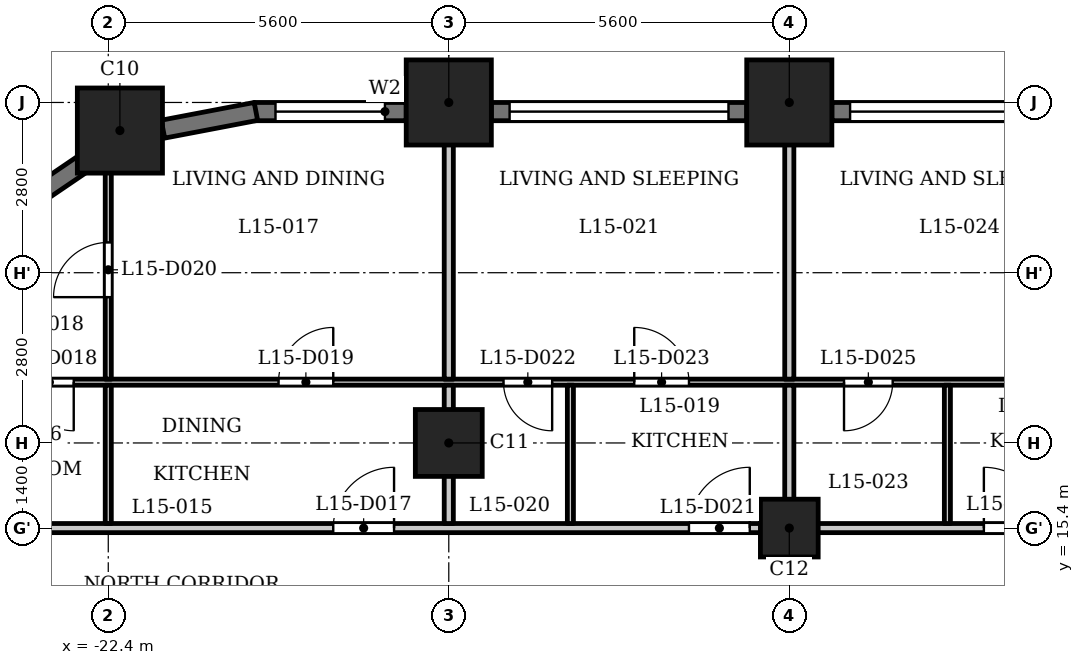
"""IFC4 building model, lengths in metres.
Left out: names, types, materials, properties, quantities, classifications, styles, units other than length and angle.
Written with IfcOpenShell. Run it as: python <this file> out.ifc"""

import sys

from ifc_helpers import new_model, si_unit, direction, frame, frame_2d, origin, origin_2d, place, context, subcontext, project, spatial, rectangle, extrude, element, fill, save


model = new_model("IFC4")
c1 = context("Model", 3, precision=1e-05, world=origin(), true_north=direction((0.0, 1.0)))
c2 = subcontext(c1, "Body", "Model", "MODEL_VIEW")
j1 = project(units=[si_unit("LENGTHUNIT", "METRE"), si_unit("PLANEANGLEUNIT", "RADIAN")], contexts=[c1])
p1 = place(None, origin())
s1 = spatial("IfcSite", under=j1, at=p1, CompositionType="ELEMENT")
p2 = place(p1, origin())
s2 = spatial("IfcBuilding", under=s1, at=p2, CompositionType="ELEMENT")
p3 = place(p2, frame((0.0, 0.0, 62.0)))
s3 = spatial("IfcBuildingStorey", under=s2, at=p3, CompositionType="ELEMENT", Elevation=62.0)
for number, where, z_axis, x_axis in (
    (1, (-11.2, 22.4, 0.0), (0.0, 0.0, 1.0), (1.0, 0.0, 0.0)),
    (2, (-16.8, 22.4, 0.0), (0.0, 0.0, 1.0), (1.0, 0.0, 0.0)),
    (3, (-22.209, 21.938, 0.0), (0.0, 0.0, 1.0), (1.0, 0.0, 0.0)),
):
    element("IfcColumn", number, at=place(p3, frame(where, z_axis=z_axis, x_axis=x_axis)), inside=s3, PredefinedType="COLUMN", context=c2, shape_type="SweptSolid", body=[
        extrude(rectangle(XDim=1.4, YDim=1.4, at=origin_2d()), origin(), (0.0, 0.0, 1.0), 3.5),
    ])
p4 = place(p3, frame((-16.8, 16.8, 0.0), z_axis=(0.0, 0.0, 1.0), x_axis=(1.0, 0.0, 0.0)))
e4 = element("IfcColumn", 4, at=p4, inside=s3, PredefinedType="COLUMN", context=c2, shape_type="SweptSolid", body=[
    extrude(rectangle(XDim=1.1, YDim=1.1, at=origin_2d()), origin(), (0.0, 0.0, 1.0), 3.5),
])
p5 = place(p3, frame((-11.2, 15.4, 0.0), z_axis=(0.0, 0.0, 1.0), x_axis=(1.0, 0.0, 0.0)))
e5 = element("IfcColumn", 5, at=p5, inside=s3, PredefinedType="COLUMN", context=c2, shape_type="SweptSolid", body=[
    extrude(rectangle(XDim=0.95, YDim=0.95, at=origin_2d()), origin(), (0.0, 0.0, 1.0), 3.5),
])
p6 = place(p3, frame((-6.3, 22.25, 0.0), z_axis=(0.0, 0.0, 1.0), x_axis=(-1.0, 0.0, 0.0)))
e6 = element("IfcWall", 6, at=p6, inside=s3, PredefinedType="SOLIDWALL", context=c2, shape_type="SweptSolid", body=[
    extrude(rectangle(XDim=4.2, YDim=0.3, at=frame_2d((2.1, 0.0))), origin(), (0.0, 0.0, 1.0), 2.35),
])
p7 = place(p6, frame((0.3, 0.0, 1.2)))
e7 = element("IfcOpeningElement", 7, at=p7, cuts=e6, PredefinedType="OPENING", context=c2, shape_type="SweptSolid", body=[
    extrude(rectangle(XDim=3.6, YDim=0.95, at=frame_2d((1.8, 0.475))), frame((0.0, 0.16, 0.0), z_axis=(0.0, -1.0, 0.0), x_axis=(1.0, 0.0, 0.0)), (0.0, 0.0, 1.0), 0.32),
])
p8 = place(p3, frame((-11.9, 22.25, 0.0), z_axis=(0.0, 0.0, 1.0), x_axis=(-1.0, 0.0, 0.0)))
e8 = element("IfcWall", 8, at=p8, inside=s3, PredefinedType="SOLIDWALL", context=c2, shape_type="SweptSolid", body=[
    extrude(rectangle(XDim=4.2, YDim=0.3, at=frame_2d((2.1, 0.0))), origin(), (0.0, 0.0, 1.0), 2.35),
])
p9 = place(p8, frame((0.3, 0.0, 1.2)))
e9 = element("IfcOpeningElement", 9, at=p9, cuts=e8, PredefinedType="OPENING", context=c2, shape_type="SweptSolid", body=[
    extrude(rectangle(XDim=3.6, YDim=0.95, at=frame_2d((1.8, 0.475))), frame((0.0, 0.16, 0.0), z_axis=(0.0, -1.0, 0.0), x_axis=(1.0, 0.0, 0.0)), (0.0, 0.0, 1.0), 0.32),
])
p10 = place(p3, frame((-17.5, 22.25, 0.0), z_axis=(0.0, 0.0, 1.0), x_axis=(-1.0, 0.0, 0.0)))
e10 = element("IfcWall", 10, at=p10, inside=s3, PredefinedType="SOLIDWALL", context=c2, shape_type="SweptSolid", body=[
    extrude(rectangle(XDim=2.5, YDim=0.3, at=frame_2d((1.25, 0.0))), origin(), (0.0, 0.0, 1.0), 2.35),
])
p11 = place(p10, frame((0.35, 0.0, 0.9)))
e11 = element("IfcOpeningElement", 11, at=p11, cuts=e10, PredefinedType="OPENING", context=c2, shape_type="SweptSolid", body=[
    extrude(rectangle(XDim=1.8, YDim=1.25, at=frame_2d((0.9, 0.625))), frame((0.0, 0.16, 0.0), z_axis=(0.0, -1.0, 0.0), x_axis=(1.0, 0.0, 0.0)), (0.0, 0.0, 1.0), 0.32),
])
p12 = place(p3, frame((-19.972, 22.253, 0.0), z_axis=(0.0, 0.0, 1.0), x_axis=(-0.982297345734, -0.187328386968, 0.0)))
e12 = element("IfcWall", 12, at=p12, inside=s3, PredefinedType="SOLIDWALL", context=c2, shape_type="SweptSolid", body=[
    extrude(rectangle(XDim=1.556, YDim=0.3, at=frame_2d((0.778, 0.0))), origin(), (0.0, 0.0, 1.0), 2.35),
])
p13 = place(p3, frame((-22.726, 21.454, 0.0), z_axis=(0.0, 0.0, 1.0), x_axis=(-0.827019875346, -0.562172683241, 0.0)))
e13 = element("IfcWall", 13, at=p13, inside=s3, PredefinedType="SOLIDWALL", context=c2, shape_type="SweptSolid", body=[
    extrude(rectangle(XDim=1.556, YDim=0.3, at=frame_2d((0.778, 0.0))), origin(), (0.0, 0.0, 1.0), 2.35),
])
p14 = place(p3, frame((-27.484, 15.4, 0.0), z_axis=(0.0, 0.0, 1.0), x_axis=(1.0, 0.0, 0.0)))
e14 = element("IfcWall", 14, at=p14, inside=s3, PredefinedType="PARTITIONING", context=c2, shape_type="SweptSolid", body=[
    extrude(rectangle(XDim=54.968, YDim=0.15, at=frame_2d((27.484, 0.0))), origin(), (0.0, 0.0, 1.0), 3.2),
])
p15 = place(p14, frame((8.784, 0.0, 0.0)))
e15 = element("IfcOpeningElement", 15, at=p15, cuts=e14, PredefinedType="OPENING", context=c2, shape_type="SweptSolid", body=[
    extrude(rectangle(XDim=1.0, YDim=2.1, at=frame_2d((0.5, 1.05))), frame((0.0, 0.085, 0.0), z_axis=(0.0, -1.0, 0.0), x_axis=(1.0, 0.0, 0.0)), (0.0, 0.0, 1.0), 0.17),
])
p16 = place(p14, frame((14.634, 0.0, 0.0)))
e16 = element("IfcOpeningElement", 16, at=p16, cuts=e14, PredefinedType="OPENING", context=c2, shape_type="SweptSolid", body=[
    extrude(rectangle(XDim=1.0, YDim=2.1, at=frame_2d((0.5, 1.05))), frame((0.0, 0.085, 0.0), z_axis=(0.0, -1.0, 0.0), x_axis=(1.0, 0.0, 0.0)), (0.0, 0.0, 1.0), 0.17),
])
p17 = place(p14, frame((19.484, 0.0, 0.0)))
e17 = element("IfcOpeningElement", 17, at=p17, cuts=e14, PredefinedType="OPENING", context=c2, shape_type="SweptSolid", body=[
    extrude(rectangle(XDim=1.0, YDim=2.1, at=frame_2d((0.5, 1.05))), frame((0.0, 0.085, 0.0), z_axis=(0.0, -1.0, 0.0), x_axis=(1.0, 0.0, 0.0)), (0.0, 0.0, 1.0), 0.17),
])
p18 = place(p14, frame((23.634, 0.0, 0.0)))
e18 = element("IfcOpeningElement", 18, at=p18, cuts=e14, PredefinedType="OPENING", context=c2, shape_type="SweptSolid", body=[
    extrude(rectangle(XDim=1.0, YDim=2.1, at=frame_2d((0.5, 1.05))), frame((0.0, 0.085, 0.0), z_axis=(0.0, -1.0, 0.0), x_axis=(1.0, 0.0, 0.0)), (0.0, 0.0, 1.0), 0.17),
])
p19 = place(p14, frame((28.234, 0.0, 0.0)))
e19 = element("IfcOpeningElement", 19, at=p19, cuts=e14, PredefinedType="OPENING", context=c2, shape_type="SweptSolid", body=[
    extrude(rectangle(XDim=1.0, YDim=2.1, at=frame_2d((0.5, 1.05))), frame((0.0, 0.085, 0.0), z_axis=(0.0, -1.0, 0.0), x_axis=(1.0, 0.0, 0.0)), (0.0, 0.0, 1.0), 0.17),
])
p20 = place(p14, frame((33.784, 0.0, 0.0)))
e20 = element("IfcOpeningElement", 20, at=p20, cuts=e14, PredefinedType="OPENING", context=c2, shape_type="SweptSolid", body=[
    extrude(rectangle(XDim=1.0, YDim=2.1, at=frame_2d((0.5, 1.05))), frame((0.0, 0.085, 0.0), z_axis=(0.0, -1.0, 0.0), x_axis=(1.0, 0.0, 0.0)), (0.0, 0.0, 1.0), 0.17),
])
p21 = place(p14, frame((39.534, 0.0, 0.0)))
e21 = element("IfcOpeningElement", 21, at=p21, cuts=e14, PredefinedType="OPENING", context=c2, shape_type="SweptSolid", body=[
    extrude(rectangle(XDim=1.0, YDim=2.1, at=frame_2d((0.5, 1.05))), frame((0.0, 0.085, 0.0), z_axis=(0.0, -1.0, 0.0), x_axis=(1.0, 0.0, 0.0)), (0.0, 0.0, 1.0), 0.17),
])
p22 = place(p14, frame((48.234, 0.0, 0.0)))
e22 = element("IfcOpeningElement", 22, at=p22, cuts=e14, PredefinedType="OPENING", context=c2, shape_type="SweptSolid", body=[
    extrude(rectangle(XDim=1.0, YDim=2.1, at=frame_2d((0.5, 1.05))), frame((0.0, 0.085, 0.0), z_axis=(0.0, -1.0, 0.0), x_axis=(1.0, 0.0, 0.0)), (0.0, 0.0, 1.0), 0.17),
])
p23 = place(p3, frame((-26.64, 17.8, 0.0), z_axis=(0.0, 0.0, 1.0), x_axis=(1.0, 0.0, 0.0)))
e23 = element("IfcWall", 23, at=p23, inside=s3, PredefinedType="PARTITIONING", context=c2, shape_type="SweptSolid", body=[
    extrude(rectangle(XDim=53.034, YDim=0.1, at=frame_2d((26.517, 0.0))), origin(), (0.0, 0.0, 1.0), 3.2),
])
p24 = place(p23, frame((2.872, 0.0, 0.0)))
e24 = element("IfcOpeningElement", 24, at=p24, cuts=e23, PredefinedType="OPENING", context=c2, shape_type="SweptSolid", body=[
    extrude(rectangle(XDim=0.8, YDim=2.1, at=frame_2d((0.4, 1.05))), frame((0.0, 0.06, 0.0), z_axis=(0.0, -1.0, 0.0), x_axis=(1.0, 0.0, 0.0)), (0.0, 0.0, 1.0), 0.12),
])
p25 = place(p23, frame((7.04, 0.0, 0.0)))
e25 = element("IfcOpeningElement", 25, at=p25, cuts=e23, PredefinedType="OPENING", context=c2, shape_type="SweptSolid", body=[
    extrude(rectangle(XDim=0.9, YDim=2.1, at=frame_2d((0.45, 1.05))), frame((0.0, 0.06, 0.0), z_axis=(0.0, -1.0, 0.0), x_axis=(1.0, 0.0, 0.0)), (0.0, 0.0, 1.0), 0.12),
])
p26 = place(p23, frame((10.74, 0.0, 0.0)))
e26 = element("IfcOpeningElement", 26, at=p26, cuts=e23, PredefinedType="OPENING", context=c2, shape_type="SweptSolid", body=[
    extrude(rectangle(XDim=0.8, YDim=2.1, at=frame_2d((0.4, 1.05))), frame((0.0, 0.06, 0.0), z_axis=(0.0, -1.0, 0.0), x_axis=(1.0, 0.0, 0.0)), (0.0, 0.0, 1.0), 0.12),
])
p27 = place(p23, frame((12.89, 0.0, 0.0)))
e27 = element("IfcOpeningElement", 27, at=p27, cuts=e23, PredefinedType="OPENING", context=c2, shape_type="SweptSolid", body=[
    extrude(rectangle(XDim=0.9, YDim=2.1, at=frame_2d((0.45, 1.05))), frame((0.0, 0.06, 0.0), z_axis=(0.0, -1.0, 0.0), x_axis=(1.0, 0.0, 0.0)), (0.0, 0.0, 1.0), 0.12),
])
p28 = place(p23, frame((16.34, 0.0, 0.0)))
e28 = element("IfcOpeningElement", 28, at=p28, cuts=e23, PredefinedType="OPENING", context=c2, shape_type="SweptSolid", body=[
    extrude(rectangle(XDim=0.8, YDim=2.1, at=frame_2d((0.4, 1.05))), frame((0.0, 0.06, 0.0), z_axis=(0.0, -1.0, 0.0), x_axis=(1.0, 0.0, 0.0)), (0.0, 0.0, 1.0), 0.12),
])
p29 = place(p23, frame((19.74, 0.0, 0.0)))
e29 = element("IfcOpeningElement", 29, at=p29, cuts=e23, PredefinedType="OPENING", context=c2, shape_type="SweptSolid", body=[
    extrude(rectangle(XDim=0.9, YDim=2.1, at=frame_2d((0.45, 1.05))), frame((0.0, 0.06, 0.0), z_axis=(0.0, -1.0, 0.0), x_axis=(1.0, 0.0, 0.0)), (0.0, 0.0, 1.0), 0.12),
])
p30 = place(p23, frame((25.09, 0.0, 0.0)))
e30 = element("IfcOpeningElement", 30, at=p30, cuts=e23, PredefinedType="OPENING", context=c2, shape_type="SweptSolid", body=[
    extrude(rectangle(XDim=0.8, YDim=2.1, at=frame_2d((0.4, 1.05))), frame((0.0, 0.06, 0.0), z_axis=(0.0, -1.0, 0.0), x_axis=(1.0, 0.0, 0.0)), (0.0, 0.0, 1.0), 0.12),
])
p31 = place(p23, frame((21.89, 0.0, 0.0)))
e31 = element("IfcOpeningElement", 31, at=p31, cuts=e23, PredefinedType="OPENING", context=c2, shape_type="SweptSolid", body=[
    extrude(rectangle(XDim=0.9, YDim=2.1, at=frame_2d((0.45, 1.05))), frame((0.0, 0.06, 0.0), z_axis=(0.0, -1.0, 0.0), x_axis=(1.0, 0.0, 0.0)), (0.0, 0.0, 1.0), 0.12),
])
p32 = place(p23, frame((30.69, 0.0, 0.0)))
e32 = element("IfcOpeningElement", 32, at=p32, cuts=e23, PredefinedType="OPENING", context=c2, shape_type="SweptSolid", body=[
    extrude(rectangle(XDim=0.8, YDim=2.1, at=frame_2d((0.4, 1.05))), frame((0.0, 0.06, 0.0), z_axis=(0.0, -1.0, 0.0), x_axis=(1.0, 0.0, 0.0)), (0.0, 0.0, 1.0), 0.12),
])
p33 = place(p23, frame((28.49, 0.0, 0.0)))
e33 = element("IfcOpeningElement", 33, at=p33, cuts=e23, PredefinedType="OPENING", context=c2, shape_type="SweptSolid", body=[
    extrude(rectangle(XDim=0.9, YDim=2.1, at=frame_2d((0.45, 1.05))), frame((0.0, 0.06, 0.0), z_axis=(0.0, -1.0, 0.0), x_axis=(1.0, 0.0, 0.0)), (0.0, 0.0, 1.0), 0.12),
])
p34 = place(p23, frame((36.49, 0.0, 0.0)))
e34 = element("IfcOpeningElement", 34, at=p34, cuts=e23, PredefinedType="OPENING", context=c2, shape_type="SweptSolid", body=[
    extrude(rectangle(XDim=0.8, YDim=2.1, at=frame_2d((0.4, 1.05))), frame((0.0, 0.06, 0.0), z_axis=(0.0, -1.0, 0.0), x_axis=(1.0, 0.0, 0.0)), (0.0, 0.0, 1.0), 0.12),
])
p35 = place(p23, frame((33.04, 0.0, 0.0)))
e35 = element("IfcOpeningElement", 35, at=p35, cuts=e23, PredefinedType="OPENING", context=c2, shape_type="SweptSolid", body=[
    extrude(rectangle(XDim=0.9, YDim=2.1, at=frame_2d((0.45, 1.05))), frame((0.0, 0.06, 0.0), z_axis=(0.0, -1.0, 0.0), x_axis=(1.0, 0.0, 0.0)), (0.0, 0.0, 1.0), 0.12),
])
p36 = place(p23, frame((41.49, 0.0, 0.0)))
e36 = element("IfcOpeningElement", 36, at=p36, cuts=e23, PredefinedType="OPENING", context=c2, shape_type="SweptSolid", body=[
    extrude(rectangle(XDim=0.8, YDim=2.1, at=frame_2d((0.4, 1.05))), frame((0.0, 0.06, 0.0), z_axis=(0.0, -1.0, 0.0), x_axis=(1.0, 0.0, 0.0)), (0.0, 0.0, 1.0), 0.12),
])
p37 = place(p23, frame((39.79, 0.0, 0.0)))
e37 = element("IfcOpeningElement", 37, at=p37, cuts=e23, PredefinedType="OPENING", context=c2, shape_type="SweptSolid", body=[
    extrude(rectangle(XDim=0.9, YDim=2.1, at=frame_2d((0.45, 1.05))), frame((0.0, 0.06, 0.0), z_axis=(0.0, -1.0, 0.0), x_axis=(1.0, 0.0, 0.0)), (0.0, 0.0, 1.0), 0.12),
])
p38 = place(p23, frame((51.44, 0.0, 0.0)))
e38 = element("IfcOpeningElement", 38, at=p38, cuts=e23, PredefinedType="OPENING", context=c2, shape_type="SweptSolid", body=[
    extrude(rectangle(XDim=0.8, YDim=2.1, at=frame_2d((0.4, 1.05))), frame((0.0, 0.06, 0.0), z_axis=(0.0, -1.0, 0.0), x_axis=(1.0, 0.0, 0.0)), (0.0, 0.0, 1.0), 0.12),
])
p39 = place(p23, frame((46.49, 0.0, 0.0)))
e39 = element("IfcOpeningElement", 39, at=p39, cuts=e23, PredefinedType="OPENING", context=c2, shape_type="SweptSolid", body=[
    extrude(rectangle(XDim=0.9, YDim=2.1, at=frame_2d((0.45, 1.05))), frame((0.0, 0.06, 0.0), z_axis=(0.0, -1.0, 0.0), x_axis=(1.0, 0.0, 0.0)), (0.0, 0.0, 1.0), 0.12),
])
p40 = place(p3, frame((-22.4, 15.475, 0.0), z_axis=(0.0, 0.0, 1.0), x_axis=(0.0, 1.0, 0.0)))
e40 = element("IfcWall", 40, at=p40, inside=s3, PredefinedType="PARTITIONING", context=c2, shape_type="SweptSolid", body=[
    extrude(rectangle(XDim=2.275, YDim=0.1, at=frame_2d((1.137, 0.0))), origin(), (0.0, 0.0, 1.0), 3.2),
])
p41 = place(p3, frame((-22.4, 17.85, 0.0), z_axis=(0.0, 0.0, 1.0), x_axis=(0.0, 1.0, 0.0)))
e41 = element("IfcWall", 41, at=p41, inside=s3, PredefinedType="PARTITIONING", context=c2, shape_type="SweptSolid", body=[
    extrude(rectangle(XDim=3.87, YDim=0.1, at=frame_2d((1.935, 0.0))), origin(), (0.0, 0.0, 1.0), 3.2),
])
p42 = place(p41, frame((1.348, 0.0, 0.0)))
e42 = element("IfcOpeningElement", 42, at=p42, cuts=e41, PredefinedType="OPENING", context=c2, shape_type="SweptSolid", body=[
    extrude(rectangle(XDim=0.9, YDim=2.1, at=frame_2d((0.45, 1.05))), frame((0.0, 0.06, 0.0), z_axis=(0.0, -1.0, 0.0), x_axis=(1.0, 0.0, 0.0)), (0.0, 0.0, 1.0), 0.12),
])
p43 = place(p3, frame((-16.8, 15.475, 0.0), z_axis=(0.0, 0.0, 1.0), x_axis=(0.0, 1.0, 0.0)))
e43 = element("IfcWall", 43, at=p43, inside=s3, PredefinedType="PARTITIONING", context=c2, shape_type="SweptSolid", body=[
    extrude(rectangle(XDim=2.275, YDim=0.15, at=frame_2d((1.137, 0.0))), origin(), (0.0, 0.0, 1.0), 3.2),
])
p44 = place(p3, frame((-16.8, 17.85, 0.0), z_axis=(0.0, 0.0, 1.0), x_axis=(0.0, 1.0, 0.0)))
e44 = element("IfcWall", 44, at=p44, inside=s3, PredefinedType="PARTITIONING", context=c2, shape_type="SweptSolid", body=[
    extrude(rectangle(XDim=5.23, YDim=0.15, at=frame_2d((2.615, 0.0))), origin(), (0.0, 0.0, 1.0), 3.2),
])
p45 = place(p3, frame((-14.8, 15.475, 0.0), z_axis=(0.0, 0.0, 1.0), x_axis=(0.0, 1.0, 0.0)))
e45 = element("IfcWall", 45, at=p45, inside=s3, PredefinedType="PARTITIONING", context=c2, shape_type="SweptSolid", body=[
    extrude(rectangle(XDim=2.275, YDim=0.1, at=frame_2d((1.137, 0.0))), origin(), (0.0, 0.0, 1.0), 3.2),
])
p46 = place(p3, frame((-11.2, 15.475, 0.0), z_axis=(0.0, 0.0, 1.0), x_axis=(0.0, 1.0, 0.0)))
e46 = element("IfcWall", 46, at=p46, inside=s3, PredefinedType="PARTITIONING", context=c2, shape_type="SweptSolid", body=[
    extrude(rectangle(XDim=2.275, YDim=0.15, at=frame_2d((1.137, 0.0))), origin(), (0.0, 0.0, 1.0), 3.2),
])
p47 = place(p3, frame((-11.2, 17.85, 0.0), z_axis=(0.0, 0.0, 1.0), x_axis=(0.0, 1.0, 0.0)))
e47 = element("IfcWall", 47, at=p47, inside=s3, PredefinedType="PARTITIONING", context=c2, shape_type="SweptSolid", body=[
    extrude(rectangle(XDim=5.23, YDim=0.15, at=frame_2d((2.615, 0.0))), origin(), (0.0, 0.0, 1.0), 3.2),
])
p48 = place(p3, frame((-8.6, 15.475, 0.0), z_axis=(0.0, 0.0, 1.0), x_axis=(0.0, 1.0, 0.0)))
e48 = element("IfcWall", 48, at=p48, inside=s3, PredefinedType="PARTITIONING", context=c2, shape_type="SweptSolid", body=[
    extrude(rectangle(XDim=2.275, YDim=0.1, at=frame_2d((1.137, 0.0))), origin(), (0.0, 0.0, 1.0), 3.2),
])
p49 = place(p15, origin())
e49 = element("IfcDoor", 49, at=p49, inside=s3, OperationType="SINGLE_SWING_LEFT", PredefinedType="DOOR", context=c2, shape_type="SweptSolid", body=[
    extrude(rectangle(XDim=1.0, YDim=2.1, at=frame_2d((0.5, 1.05))), frame((0.0, 0.025, 0.0), z_axis=(0.0, -1.0, 0.0), x_axis=(1.0, 0.0, 0.0)), (0.0, 0.0, 1.0), 0.05),
])
fill(e15, e49)
p50 = place(p24, origin())
e50 = element("IfcDoor", 50, at=p50, inside=s3, OperationType="SINGLE_SWING_RIGHT", PredefinedType="DOOR", context=c2, shape_type="SweptSolid", body=[
    extrude(rectangle(XDim=0.8, YDim=2.1, at=frame_2d((0.4, 1.05))), frame((0.0, 0.025, 0.0), z_axis=(0.0, -1.0, 0.0), x_axis=(1.0, 0.0, 0.0)), (0.0, 0.0, 1.0), 0.05),
])
fill(e24, e50)
p51 = place(p25, origin())
e51 = element("IfcDoor", 51, at=p51, inside=s3, OperationType="SINGLE_SWING_LEFT", PredefinedType="DOOR", context=c2, shape_type="SweptSolid", body=[
    extrude(rectangle(XDim=0.9, YDim=2.1, at=frame_2d((0.45, 1.05))), frame((0.0, 0.025, 0.0), z_axis=(0.0, -1.0, 0.0), x_axis=(1.0, 0.0, 0.0)), (0.0, 0.0, 1.0), 0.05),
])
fill(e25, e51)
p52 = place(p42, origin())
e52 = element("IfcDoor", 52, at=p52, inside=s3, OperationType="SINGLE_SWING_RIGHT", PredefinedType="DOOR", context=c2, shape_type="SweptSolid", body=[
    extrude(rectangle(XDim=0.9, YDim=2.1, at=frame_2d((0.45, 1.05))), frame((0.0, 0.025, 0.0), z_axis=(0.0, -1.0, 0.0), x_axis=(1.0, 0.0, 0.0)), (0.0, 0.0, 1.0), 0.05),
])
fill(e42, e52)
p53 = place(p16, origin())
e53 = element("IfcDoor", 53, at=p53, inside=s3, OperationType="SINGLE_SWING_LEFT", PredefinedType="DOOR", context=c2, shape_type="SweptSolid", body=[
    extrude(rectangle(XDim=1.0, YDim=2.1, at=frame_2d((0.5, 1.05))), frame((0.0, 0.025, 0.0), z_axis=(0.0, -1.0, 0.0), x_axis=(1.0, 0.0, 0.0)), (0.0, 0.0, 1.0), 0.05),
])
fill(e16, e53)
p54 = place(p26, origin())
e54 = element("IfcDoor", 54, at=p54, inside=s3, OperationType="SINGLE_SWING_RIGHT", PredefinedType="DOOR", context=c2, shape_type="SweptSolid", body=[
    extrude(rectangle(XDim=0.8, YDim=2.1, at=frame_2d((0.4, 1.05))), frame((0.0, 0.025, 0.0), z_axis=(0.0, -1.0, 0.0), x_axis=(1.0, 0.0, 0.0)), (0.0, 0.0, 1.0), 0.05),
])
fill(e26, e54)
p55 = place(p27, origin())
e55 = element("IfcDoor", 55, at=p55, inside=s3, OperationType="SINGLE_SWING_RIGHT", PredefinedType="DOOR", context=c2, shape_type="SweptSolid", body=[
    extrude(rectangle(XDim=0.9, YDim=2.1, at=frame_2d((0.45, 1.05))), frame((0.0, 0.025, 0.0), z_axis=(0.0, -1.0, 0.0), x_axis=(1.0, 0.0, 0.0)), (0.0, 0.0, 1.0), 0.05),
])
fill(e27, e55)
p56 = place(p17, origin())
e56 = element("IfcDoor", 56, at=p56, inside=s3, OperationType="SINGLE_SWING_RIGHT", PredefinedType="DOOR", context=c2, shape_type="SweptSolid", body=[
    extrude(rectangle(XDim=1.0, YDim=2.1, at=frame_2d((0.5, 1.05))), frame((0.0, 0.025, 0.0), z_axis=(0.0, -1.0, 0.0), x_axis=(1.0, 0.0, 0.0)), (0.0, 0.0, 1.0), 0.05),
])
fill(e17, e56)
p57 = place(p28, origin())
e57 = element("IfcDoor", 57, at=p57, inside=s3, OperationType="SINGLE_SWING_LEFT", PredefinedType="DOOR", context=c2, shape_type="SweptSolid", body=[
    extrude(rectangle(XDim=0.8, YDim=2.1, at=frame_2d((0.4, 1.05))), frame((0.0, 0.025, 0.0), z_axis=(0.0, -1.0, 0.0), x_axis=(1.0, 0.0, 0.0)), (0.0, 0.0, 1.0), 0.05),
])
fill(e28, e57)
p58 = place(p7, origin())
e58 = element("IfcWindow", 58, at=p58, inside=s3, PartitioningType="SINGLE_PANEL", PredefinedType="WINDOW", context=c2, shape_type="SweptSolid", body=[
    extrude(rectangle(XDim=3.6, YDim=0.95, at=frame_2d((1.8, 0.475))), frame((0.0, 0.03, 0.0), z_axis=(0.0, -1.0, 0.0), x_axis=(1.0, 0.0, 0.0)), (0.0, 0.0, 1.0), 0.06),
])
fill(e7, e58)
p59 = place(p9, origin())
e59 = element("IfcWindow", 59, at=p59, inside=s3, PartitioningType="SINGLE_PANEL", PredefinedType="WINDOW", context=c2, shape_type="SweptSolid", body=[
    extrude(rectangle(XDim=3.6, YDim=0.95, at=frame_2d((1.8, 0.475))), frame((0.0, 0.03, 0.0), z_axis=(0.0, -1.0, 0.0), x_axis=(1.0, 0.0, 0.0)), (0.0, 0.0, 1.0), 0.06),
])
fill(e9, e59)
p60 = place(p11, origin())
e60 = element("IfcWindow", 60, at=p60, inside=s3, PartitioningType="SINGLE_PANEL", PredefinedType="WINDOW", context=c2, shape_type="SweptSolid", body=[
    extrude(rectangle(XDim=1.8, YDim=1.25, at=frame_2d((0.9, 0.625))), frame((0.0, 0.03, 0.0), z_axis=(0.0, -1.0, 0.0), x_axis=(1.0, 0.0, 0.0)), (0.0, 0.0, 1.0), 0.06),
])
fill(e11, e60)
save(model, sys.argv[1])
